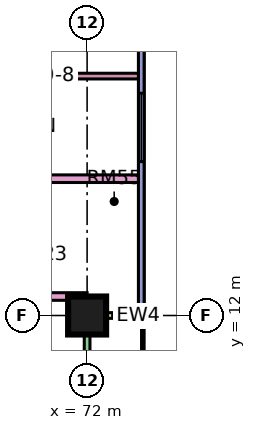
"""IFC4 building model, lengths in metres.
Left out: names, types, materials, properties, quantities, classifications, styles, units other than length and angle.
Written with IfcOpenShell. Run it as: python <this file> out.ifc"""

import sys

from ifc_helpers import new_model, si_unit, direction, frame, frame_2d, origin, origin_2d, place, context, subcontext, project, spatial, rectangle, extrude, element, fill, save


model = new_model("IFC4")
c1 = context("Model", 3, precision=1e-05, world=origin(), true_north=direction((0.0, 1.0)))
c2 = subcontext(c1, "Body", "Model", "MODEL_VIEW")
j1 = project(units=[si_unit("LENGTHUNIT", "METRE"), si_unit("PLANEANGLEUNIT", "RADIAN")], contexts=[c1])
p1 = place(None, origin())
s1 = spatial("IfcSite", under=j1, at=p1, CompositionType="ELEMENT")
p2 = place(p1, origin())
s2 = spatial("IfcBuilding", under=s1, at=p2, CompositionType="ELEMENT")
p3 = place(p2, frame((0.0, 0.0, 91.9)))
s3 = spatial("IfcBuildingStorey", under=s2, at=p3, CompositionType="ELEMENT", Elevation=91.9)
p4 = place(p3, frame((72.0, 12.0, 0.0), z_axis=(0.0, 0.0, 1.0), x_axis=(1.0, 0.0, 0.0)))
e1 = element("IfcColumn", 1, at=p4, inside=s3, PredefinedType="COLUMN", context=c2, shape_type="SweptSolid", body=[
    extrude(rectangle(XDim=1.0, YDim=1.0, at=origin_2d()), origin(), (0.0, 0.0, 1.0), 3.75),
])
p5 = place(p3, frame((72.0, 1.575, 0.0), z_axis=(0.0, 0.0, 1.0), x_axis=(0.0, 1.0, 0.0)))
e2 = element("IfcWall", 2, at=p5, inside=s3, PredefinedType="SOLIDWALL", context=c2, shape_type="SweptSolid", body=[
    extrude(rectangle(XDim=10.35, YDim=0.15, at=frame_2d((5.175, 0.0))), origin(), (0.0, 0.0, 1.0), 3.35),
])
p6 = place(p5, frame((4.012, 0.0, 0.0)))
e3 = element("IfcOpeningElement", 3, at=p6, cuts=e2, PredefinedType="OPENING", context=c2, shape_type="SweptSolid", body=[
    extrude(rectangle(XDim=1.8, YDim=2.4, at=frame_2d((0.9, 1.2))), frame((0.0, 0.085, 0.0), z_axis=(0.0, -1.0, 0.0), x_axis=(1.0, 0.0, 0.0)), (0.0, 0.0, 1.0), 0.17),
])
p7 = place(p3, frame((73.5, 12.0, 0.0), z_axis=(0.0, 0.0, 1.0), x_axis=(-1.0, 0.0, 0.0)))
e4 = element("IfcWall", 4, at=p7, inside=s3, PredefinedType="SOLIDWALL", context=c2, shape_type="SweptSolid", body=[
    extrude(rectangle(XDim=1.5, YDim=0.15, at=frame_2d((0.75, 0.0))), origin(), (0.0, 0.0, 1.0), 3.35),
])
p8 = place(p3, frame((73.425, 12.075, 0.0), z_axis=(0.0, 0.0, 1.0), x_axis=(0.0, 1.0, 0.0)))
e5 = element("IfcWall", 5, at=p8, inside=s3, PredefinedType="SOLIDWALL", context=c2, shape_type="SweptSolid", body=[
    extrude(rectangle(XDim=10.425, YDim=0.15, at=frame_2d((5.212, 0.0))), origin(), (0.0, 0.0, 1.0), 3.35),
])
p9 = place(p8, frame((3.975, 0.0, 0.45)))
e6 = element("IfcOpeningElement", 6, at=p9, cuts=e5, PredefinedType="OPENING", context=c2, shape_type="SweptSolid", body=[
    extrude(rectangle(XDim=1.8, YDim=2.4, at=frame_2d((0.9, 1.2))), frame((0.0, 0.085, 0.0), z_axis=(0.0, -1.0, 0.0), x_axis=(1.0, 0.0, 0.0)), (0.0, 0.0, 1.0), 0.17),
])
p10 = place(p8, frame((8.025, 0.0, 0.45)))
e7 = element("IfcOpeningElement", 7, at=p10, cuts=e5, PredefinedType="OPENING", context=c2, shape_type="SweptSolid", body=[
    extrude(rectangle(XDim=1.8, YDim=2.4, at=frame_2d((0.9, 1.2))), frame((0.0, 0.085, 0.0), z_axis=(0.0, -1.0, 0.0), x_axis=(1.0, 0.0, 0.0)), (0.0, 0.0, 1.0), 0.17),
])
p11 = place(p3, frame((51.225, 15.6, 0.0), z_axis=(0.0, 0.0, 1.0), x_axis=(1.0, 0.0, 0.0)))
e8 = element("IfcWall", 8, at=p11, inside=s3, PredefinedType="PARTITIONING", context=c2, shape_type="SweptSolid", body=[
    extrude(rectangle(XDim=22.125, YDim=0.2, at=frame_2d((11.062, 0.0))), origin(), (0.0, 0.0, 1.0), 3.35),
])
p12 = place(p11, frame((6.125, 0.0, 0.0)))
e9 = element("IfcOpeningElement", 9, at=p12, cuts=e8, PredefinedType="OPENING", context=c2, shape_type="SweptSolid", body=[
    extrude(rectangle(XDim=1.0, YDim=2.1, at=frame_2d((0.5, 1.05))), frame((0.0, 0.11, 0.0), z_axis=(0.0, -1.0, 0.0), x_axis=(1.0, 0.0, 0.0)), (0.0, 0.0, 1.0), 0.22),
])
p13 = place(p11, frame((0.875, 0.0, 0.0)))
e10 = element("IfcOpeningElement", 10, at=p13, cuts=e8, PredefinedType="OPENING", context=c2, shape_type="SweptSolid", body=[
    extrude(rectangle(XDim=1.0, YDim=2.1, at=frame_2d((0.5, 1.05))), frame((0.0, 0.11, 0.0), z_axis=(0.0, -1.0, 0.0), x_axis=(1.0, 0.0, 0.0)), (0.0, 0.0, 1.0), 0.22),
])
p14 = place(p3, frame((59.325, 18.3, 0.0), z_axis=(0.0, 0.0, 1.0), x_axis=(1.0, 0.0, 0.0)))
e11 = element("IfcWall", 11, at=p14, inside=s3, PredefinedType="PARTITIONING", context=c2, shape_type="SweptSolid", body=[
    extrude(rectangle(XDim=14.025, YDim=0.15, at=frame_2d((7.013, 0.0))), origin(), (0.0, 0.0, 1.0), 3.35),
])
p15 = place(p14, frame((4.575, 0.0, 0.0)))
e12 = element("IfcOpeningElement", 12, at=p15, cuts=e11, PredefinedType="OPENING", context=c2, shape_type="SweptSolid", body=[
    extrude(rectangle(XDim=0.8, YDim=2.1, at=frame_2d((0.4, 1.05))), frame((0.0, 0.085, 0.0), z_axis=(0.0, -1.0, 0.0), x_axis=(1.0, 0.0, 0.0)), (0.0, 0.0, 1.0), 0.17),
])
p16 = place(p14, frame((9.375, 0.0, 0.0)))
e13 = element("IfcOpeningElement", 13, at=p16, cuts=e11, PredefinedType="OPENING", context=c2, shape_type="SweptSolid", body=[
    extrude(rectangle(XDim=0.9, YDim=2.1, at=frame_2d((0.45, 1.05))), frame((0.0, 0.085, 0.0), z_axis=(0.0, -1.0, 0.0), x_axis=(1.0, 0.0, 0.0)), (0.0, 0.0, 1.0), 0.17),
])
p17 = place(p14, frame((1.125, 0.0, 0.0)))
e14 = element("IfcOpeningElement", 14, at=p17, cuts=e11, PredefinedType="OPENING", context=c2, shape_type="SweptSolid", body=[
    extrude(rectangle(XDim=0.8, YDim=2.1, at=frame_2d((0.4, 1.05))), frame((0.0, 0.085, 0.0), z_axis=(0.0, -1.0, 0.0), x_axis=(1.0, 0.0, 0.0)), (0.0, 0.0, 1.0), 0.17),
])
p18 = place(p3, frame((65.7, 12.5, 0.0), z_axis=(0.0, 0.0, 1.0), x_axis=(1.0, 0.0, 0.0)))
e15 = element("IfcWall", 15, at=p18, inside=s3, PredefinedType="PARTITIONING", context=c2, shape_type="SweptSolid", body=[
    extrude(rectangle(XDim=6.3, YDim=0.2, at=frame_2d((3.15, 0.0))), origin(), (0.0, 0.0, 1.0), 3.35),
])
p19 = place(p18, frame((4.2, 0.0, 0.0)))
e16 = element("IfcOpeningElement", 16, at=p19, cuts=e15, PredefinedType="OPENING", context=c2, shape_type="SweptSolid", body=[
    extrude(rectangle(XDim=1.0, YDim=2.1, at=frame_2d((0.5, 1.05))), frame((0.0, 0.11, 0.0), z_axis=(0.0, -1.0, 0.0), x_axis=(1.0, 0.0, 0.0)), (0.0, 0.0, 1.0), 0.22),
])
p20 = place(p9, origin())
e17 = element("IfcWindow", 17, at=p20, inside=s3, PartitioningType="SINGLE_PANEL", PredefinedType="WINDOW", context=c2, shape_type="SweptSolid", body=[
    extrude(rectangle(XDim=1.8, YDim=2.4, at=frame_2d((0.9, 1.2))), frame((0.0, 0.03, 0.0), z_axis=(0.0, -1.0, 0.0), x_axis=(1.0, 0.0, 0.0)), (0.0, 0.0, 1.0), 0.06),
])
fill(e6, e17)
save(model, sys.argv[1])
